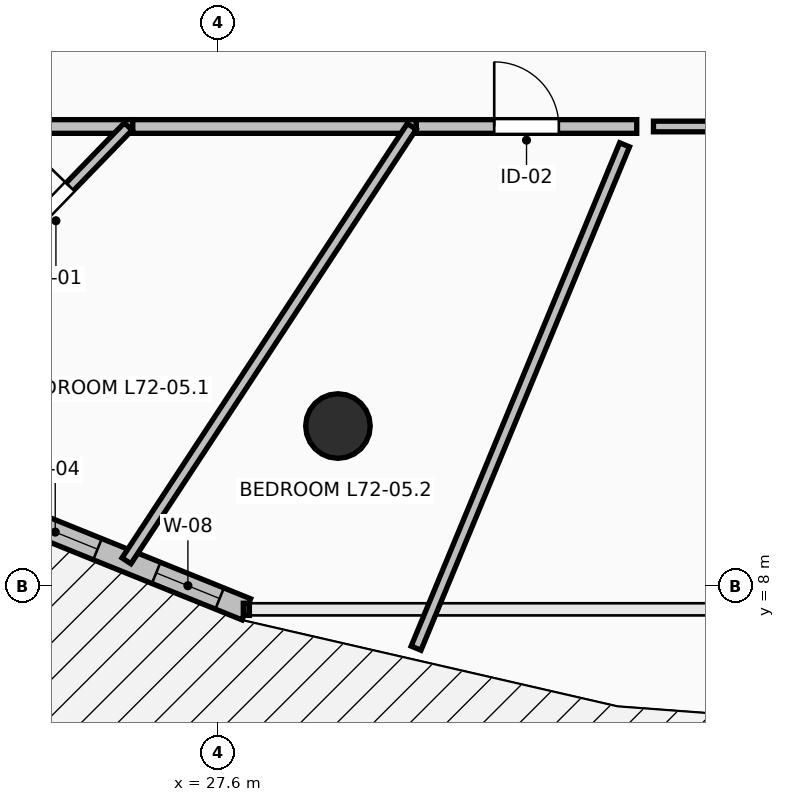
"""IFC4 building model, lengths in metres.
Left out: names, types, materials, properties, quantities, classifications, styles, units other than length and angle.
Written with IfcOpenShell. Run it as: python <this file> out.ifc"""

import sys

from ifc_helpers import new_model, si_unit, direction, frame, frame_2d, origin, origin_2d, place, context, subcontext, project, spatial, rectangle, circle, extrude, element, fill, save


model = new_model("IFC4")
c1 = context("Model", 3, precision=1e-05, world=origin(), true_north=direction((0.0, 1.0)))
c2 = subcontext(c1, "Body", "Model", "MODEL_VIEW")
j1 = project(units=[si_unit("LENGTHUNIT", "METRE"), si_unit("PLANEANGLEUNIT", "RADIAN")], contexts=[c1])
p1 = place(None, origin())
s1 = spatial("IfcSite", under=j1, at=p1, CompositionType="ELEMENT")
p2 = place(p1, origin())
s2 = spatial("IfcBuilding", under=s1, at=p2, CompositionType="ELEMENT")
p3 = place(p2, frame((0.0, 0.0, 266.2)))
s3 = spatial("IfcBuildingStorey", under=s2, at=p3, CompositionType="ELEMENT", Elevation=266.2)
p4 = place(p3, frame((29.179, 10.109, 0.0), z_axis=(0.0, 0.0, 1.0), x_axis=(-0.382683432365, -0.923879532511, 0.0)))
e1 = element("IfcColumn", 1, at=p4, inside=s3, PredefinedType="COLUMN", context=c2, shape_type="SweptSolid", body=[
    extrude(circle(Radius=0.425, at=origin_2d()), origin(), (0.0, 0.0, 1.0), 3.55),
])
p5 = place(p3, frame((23.444, 9.529, 0.0), z_axis=(0.0, 0.0, 1.0), x_axis=(0.927147375511, -0.374696869594, 0.0)))
e2 = element("IfcWall", 2, at=p5, inside=s3, PredefinedType="STANDARD", context=c2, shape_type="SweptSolid", body=[
    extrude(rectangle(XDim=4.885, YDim=0.3, at=frame_2d((2.443, 0.0))), origin(), (0.0, 0.0, 1.0), 3.29),
])
p6 = place(p5, frame((1.574, 0.0, 0.85)))
e3 = element("IfcOpeningElement", 3, at=p6, cuts=e2, PredefinedType="OPENING", context=c2, shape_type="SweptSolid", body=[
    extrude(rectangle(XDim=1.2, YDim=1.95, at=frame_2d((0.6, 0.975))), frame((0.0, 0.165, 0.0), z_axis=(0.0, -1.0, 0.0), x_axis=(1.0, 0.0, 0.0)), (0.0, 0.0, 1.0), 0.33),
])
p7 = place(p5, frame((3.606, 0.0, 0.85)))
e4 = element("IfcOpeningElement", 4, at=p7, cuts=e2, PredefinedType="OPENING", context=c2, shape_type="SweptSolid", body=[
    extrude(rectangle(XDim=0.9, YDim=1.8, at=frame_2d((0.45, 0.9))), frame((0.0, 0.165, 0.0), z_axis=(0.0, -1.0, 0.0), x_axis=(1.0, 0.0, 0.0)), (0.0, 0.0, 1.0), 0.33),
])
p8 = place(p3, frame((25.2, 14.05, 0.0), z_axis=(0.0, 0.0, 1.0), x_axis=(1.0, 0.0, 0.0)))
e5 = element("IfcWall", 5, at=p8, inside=s3, PredefinedType="PARTITIONING", context=c2, shape_type="SweptSolid", body=[
    extrude(rectangle(XDim=1.28, YDim=0.18, at=frame_2d((0.64, 0.0))), origin(), (0.0, 0.0, 1.0), 2.936),
])
p9 = place(p3, frame((26.48, 14.05, 0.0), z_axis=(0.0, 0.0, 1.0), x_axis=(1.0, 0.0, 0.0)))
e6 = element("IfcWall", 6, at=p9, inside=s3, PredefinedType="PARTITIONING", context=c2, shape_type="SweptSolid", body=[
    extrude(rectangle(XDim=3.73, YDim=0.18, at=frame_2d((1.865, 0.0))), origin(), (0.0, 0.0, 1.0), 2.482),
])
p10 = place(p3, frame((30.21, 14.05, 0.0), z_axis=(0.0, 0.0, 1.0), x_axis=(1.0, 0.0, 0.0)))
e7 = element("IfcWall", 7, at=p10, inside=s3, PredefinedType="PARTITIONING", context=c2, shape_type="SweptSolid", body=[
    extrude(rectangle(XDim=2.9, YDim=0.18, at=frame_2d((1.45, 0.0))), origin(), (0.0, 0.0, 1.0), 2.979),
])
p11 = place(p10, frame((1.025, 0.0, 0.0)))
e8 = element("IfcOpeningElement", 8, at=p11, cuts=e7, PredefinedType="OPENING", context=c2, shape_type="SweptSolid", body=[
    extrude(rectangle(XDim=0.85, YDim=2.1, at=frame_2d((0.425, 1.05))), frame((0.0, 0.105, 0.0), z_axis=(0.0, -1.0, 0.0), x_axis=(1.0, 0.0, 0.0)), (0.0, 0.0, 1.0), 0.21),
])
p12 = place(p3, frame((24.259, 11.82, 0.0), z_axis=(0.0, 0.0, 1.0), x_axis=(0.695894072482, 0.718144442215, 0.0)))
e9 = element("IfcWall", 9, at=p12, inside=s3, PredefinedType="PARTITIONING", context=c2, shape_type="SweptSolid", body=[
    extrude(rectangle(XDim=3.105, YDim=0.14, at=frame_2d((1.553, 0.0))), origin(), (0.0, 0.0, 1.0), 2.874),
])
p13 = place(p12, frame((1.103, 0.0, 0.0)))
e10 = element("IfcOpeningElement", 10, at=p13, cuts=e9, PredefinedType="OPENING", context=c2, shape_type="SweptSolid", body=[
    extrude(rectangle(XDim=0.9, YDim=2.1, at=frame_2d((0.45, 1.05))), frame((0.0, 0.085, 0.0), z_axis=(0.0, -1.0, 0.0), x_axis=(1.0, 0.0, 0.0)), (0.0, 0.0, 1.0), 0.17),
])
p14 = place(p3, frame((26.397, 8.336, 0.0), z_axis=(0.0, 0.0, 1.0), x_axis=(0.548967647923, 0.835843598728, 0.0)))
e11 = element("IfcWall", 11, at=p14, inside=s3, PredefinedType="PARTITIONING", context=c2, shape_type="SweptSolid", body=[
    extrude(rectangle(XDim=6.836, YDim=0.14, at=frame_2d((3.418, 0.0))), origin(), (0.0, 0.0, 1.0), 2.482),
])
p15 = place(p3, frame((33.33, 14.05, 0.0), z_axis=(0.0, 0.0, 1.0), x_axis=(1.0, 0.0, 0.0)))
e12 = element("IfcWall", 12, at=p15, inside=s3, PredefinedType="PARTITIONING", context=c2, shape_type="SweptSolid", body=[
    extrude(rectangle(XDim=3.22, YDim=0.14, at=frame_2d((1.61, 0.0))), origin(), (0.0, 0.0, 1.0), 2.979),
])
p16 = place(p3, frame((30.207, 7.187, 0.0), z_axis=(0.0, 0.0, 1.0), x_axis=(0.382679691634, 0.923881081964, 0.0)))
e13 = element("IfcWall", 13, at=p16, inside=s3, PredefinedType="PARTITIONING", context=c2, shape_type="SweptSolid", body=[
    extrude(rectangle(XDim=7.168, YDim=0.14, at=frame_2d((3.584, 0.0))), origin(), (0.0, 0.0, 1.0), 2.874),
])
p17 = place(p6, origin())
e14 = element("IfcWindow", 14, at=p17, inside=s3, PartitioningType="SINGLE_PANEL", PredefinedType="WINDOW", context=c2, shape_type="SweptSolid", body=[
    extrude(rectangle(XDim=1.2, YDim=1.95, at=frame_2d((0.6, 0.975))), frame((0.0, 0.03, 0.0), z_axis=(0.0, -1.0, 0.0), x_axis=(1.0, 0.0, 0.0)), (0.0, 0.0, 1.0), 0.06),
])
fill(e3, e14)
p18 = place(p7, origin())
e15 = element("IfcWindow", 15, at=p18, inside=s3, PartitioningType="SINGLE_PANEL", PredefinedType="WINDOW", context=c2, shape_type="SweptSolid", body=[
    extrude(rectangle(XDim=0.9, YDim=1.8, at=frame_2d((0.45, 0.9))), frame((0.0, 0.03, 0.0), z_axis=(0.0, -1.0, 0.0), x_axis=(1.0, 0.0, 0.0)), (0.0, 0.0, 1.0), 0.06),
])
fill(e4, e15)
p19 = place(p13, origin())
e16 = element("IfcDoor", 16, at=p19, inside=s3, OperationType="SINGLE_SWING_RIGHT", PredefinedType="DOOR", context=c2, shape_type="SweptSolid", body=[
    extrude(rectangle(XDim=0.9, YDim=2.1, at=frame_2d((0.45, 1.05))), frame((0.0, 0.025, 0.0), z_axis=(0.0, -1.0, 0.0), x_axis=(1.0, 0.0, 0.0)), (0.0, 0.0, 1.0), 0.05),
])
fill(e10, e16)
p20 = place(p11, origin())
e17 = element("IfcDoor", 17, at=p20, inside=s3, OperationType="SINGLE_SWING_LEFT", PredefinedType="DOOR", context=c2, shape_type="SweptSolid", body=[
    extrude(rectangle(XDim=0.85, YDim=2.1, at=frame_2d((0.425, 1.05))), frame((0.0, 0.025, 0.0), z_axis=(0.0, -1.0, 0.0), x_axis=(1.0, 0.0, 0.0)), (0.0, 0.0, 1.0), 0.05),
])
fill(e8, e17)
save(model, sys.argv[1])
